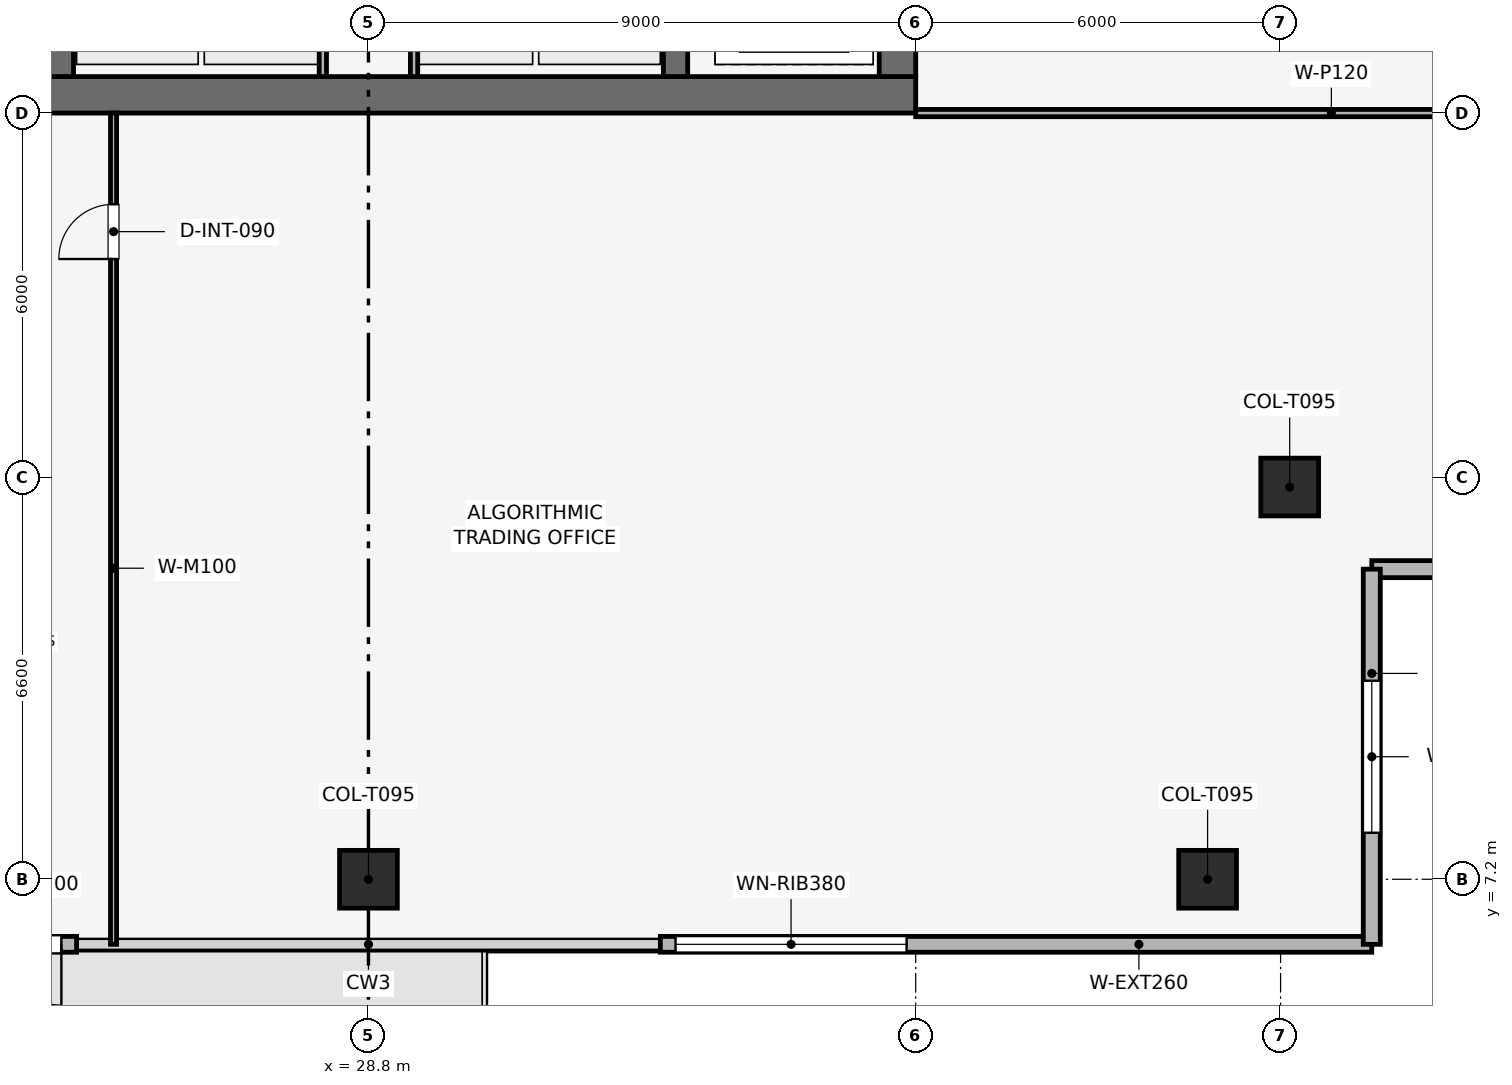
"""IFC4 building model, lengths in metres.
Left out: names, types, materials, properties, quantities, classifications, styles, units other than length and angle.
Written with IfcOpenShell. Run it as: python <this file> out.ifc"""

import sys

from ifc_helpers import new_model, si_unit, direction, frame, frame_2d, origin, origin_2d, place, context, subcontext, project, spatial, rectangle, extrude, element, fill, save


model = new_model("IFC4")
c1 = context("Model", 3, precision=1e-05, world=origin(), true_north=direction((0.0, 1.0)))
c2 = subcontext(c1, "Body", "Model", "MODEL_VIEW")
j1 = project(units=[si_unit("LENGTHUNIT", "METRE"), si_unit("PLANEANGLEUNIT", "RADIAN")], contexts=[c1])
p1 = place(None, origin())
s1 = spatial("IfcSite", under=j1, at=p1, CompositionType="ELEMENT")
p2 = place(p1, origin())
s2 = spatial("IfcBuilding", under=s1, at=p2, CompositionType="ELEMENT")
p3 = place(p2, frame((0.0, 0.0, 314.25)))
s3 = spatial("IfcBuildingStorey", under=s2, at=p3, CompositionType="ELEMENT", Elevation=314.25)
p4 = place(p3, frame((19.8, 20.1, 0.0), z_axis=(0.0, 0.0, 1.0), x_axis=(1.0, 0.0, 0.0)))
e1 = element("IfcWall", 1, at=p4, inside=s3, PredefinedType="SHEAR", context=c2, shape_type="SweptSolid", body=[
    extrude(rectangle(XDim=18.0, YDim=0.6, at=frame_2d((9.0, 0.0))), origin(), (0.0, 0.0, 1.0), 3.75),
])
p5 = place(p3, frame((37.5, 20.4, 0.0), z_axis=(0.0, 0.0, 1.0), x_axis=(0.0, 1.0, 0.0)))
e2 = element("IfcWall", 2, at=p5, inside=s3, PredefinedType="SHEAR", context=c2, shape_type="SweptSolid", body=[
    extrude(rectangle(XDim=16.8, YDim=0.6, at=frame_2d((8.4, 0.0))), origin(), (0.0, 0.0, 1.0), 3.75),
])
p6 = place(p5, frame((4.9, 0.0, 0.0)))
e3 = element("IfcOpeningElement", 3, at=p6, cuts=e2, PredefinedType="OPENING", context=c2, shape_type="SweptSolid", body=[
    extrude(rectangle(XDim=1.1, YDim=2.15, at=frame_2d((0.55, 1.075))), frame((0.0, 0.31, 0.0), z_axis=(0.0, -1.0, 0.0), x_axis=(1.0, 0.0, 0.0)), (0.0, 0.0, 1.0), 0.62),
])
for number, where, z_axis, x_axis in (
    (4, (23.75, 20.4, 0.0), (0.0, 0.0, 1.0), (0.0, 1.0, 0.0)),
    (5, (33.85, 20.4, 0.0), (0.0, 0.0, 1.0), (0.0, 1.0, 0.0)),
):
    element("IfcWall", number, at=place(p3, frame(where, z_axis=z_axis, x_axis=x_axis)), inside=s3, PredefinedType="SHEAR", context=c2, shape_type="SweptSolid", body=[
        extrude(rectangle(XDim=16.8, YDim=0.4, at=frame_2d((8.4, 0.0))), origin(), (0.0, 0.0, 1.0), 3.75),
    ])
for number, where, z_axis, x_axis in (
    (6, (28.8, 7.2, 0.003), (0.0, 0.0, 1.0), (1.0, 0.0, 0.0)),
    (7, (42.6, 7.2, 0.003), (0.0, 0.0, 1.0), (1.0, 0.0, 0.0)),
    (8, (43.95, 13.65, 0.003), (0.0, 0.0, 1.0), (1.0, 0.0, 0.0)),
):
    element("IfcColumn", number, at=place(p3, frame(where, z_axis=z_axis, x_axis=x_axis)), inside=s3, PredefinedType="COLUMN", context=c2, shape_type="SweptSolid", body=[
        extrude(rectangle(XDim=0.95, YDim=0.95, at=origin_2d()), origin(), (0.0, 0.0, 1.0), 3.504),
    ])
p7 = place(p3, frame((45.3, 6.13, 0.0), z_axis=(0.0, 0.0, 1.0), x_axis=(-1.0, 0.0, 0.0)))
e9 = element("IfcWall", 9, at=p7, inside=s3, PredefinedType="SOLIDWALL", context=c2, shape_type="SweptSolid", body=[
    extrude(rectangle(XDim=11.7, YDim=0.26, at=frame_2d((5.85, 0.0))), origin(), (0.0, 0.0, 1.0), 3.51),
])
p8 = place(p7, frame((7.65, 0.0, 0.9)))
e10 = element("IfcOpeningElement", 10, at=p8, cuts=e9, PredefinedType="OPENING", context=c2, shape_type="SweptSolid", body=[
    extrude(rectangle(XDim=3.8, YDim=1.9, at=frame_2d((1.9, 0.95))), frame((0.0, 0.14, 0.0), z_axis=(0.0, -1.0, 0.0), x_axis=(1.0, 0.0, 0.0)), (0.0, 0.0, 1.0), 0.28),
])
p9 = place(p3, frame((24.0, 6.13, 0.0), z_axis=(0.0, 0.0, 1.0), x_axis=(-1.0, 0.0, 0.0)))
e11 = element("IfcWall", 11, at=p9, inside=s3, PredefinedType="SOLIDWALL", context=c2, shape_type="SweptSolid", body=[
    extrude(rectangle(XDim=11.7, YDim=0.26, at=frame_2d((5.85, 0.0))), origin(), (0.0, 0.0, 1.0), 3.51),
])
p10 = place(p9, frame((0.25, 0.0, 0.0)))
e12 = element("IfcOpeningElement", 12, at=p10, cuts=e11, PredefinedType="OPENING", context=c2, shape_type="SweptSolid", body=[
    extrude(rectangle(XDim=1.0, YDim=2.2, at=frame_2d((0.5, 1.1))), frame((0.0, 0.14, 0.0), z_axis=(0.0, -1.0, 0.0), x_axis=(1.0, 0.0, 0.0)), (0.0, 0.0, 1.0), 0.28),
])
p11 = place(p3, frame((51.47, 12.3, 0.0), z_axis=(0.0, 0.0, 1.0), x_axis=(-1.0, 0.0, 0.0)))
e13 = element("IfcWall", 13, at=p11, inside=s3, PredefinedType="SOLIDWALL", context=c2, shape_type="SweptSolid", body=[
    extrude(rectangle(XDim=6.17, YDim=0.28, at=frame_2d((3.085, 0.0))), origin(), (0.0, 0.0, 1.0), 3.51),
])
p12 = place(p11, frame((1.835, 0.0, 0.9)))
e14 = element("IfcOpeningElement", 14, at=p12, cuts=e13, PredefinedType="OPENING", context=c2, shape_type="SweptSolid", body=[
    extrude(rectangle(XDim=2.5, YDim=1.9, at=frame_2d((1.25, 0.95))), frame((0.0, 0.15, 0.0), z_axis=(0.0, -1.0, 0.0), x_axis=(1.0, 0.0, 0.0)), (0.0, 0.0, 1.0), 0.3),
])
p13 = place(p3, frame((45.3, 12.3, 0.0), z_axis=(0.0, 0.0, 1.0), x_axis=(0.0, -1.0, 0.0)))
e15 = element("IfcWall", 15, at=p13, inside=s3, PredefinedType="SOLIDWALL", context=c2, shape_type="SweptSolid", body=[
    extrude(rectangle(XDim=6.17, YDim=0.28, at=frame_2d((3.085, 0.0))), origin(), (0.0, 0.0, 1.0), 3.51),
])
p14 = place(p13, frame((1.835, 0.0, 0.9)))
e16 = element("IfcOpeningElement", 16, at=p14, cuts=e15, PredefinedType="OPENING", context=c2, shape_type="SweptSolid", body=[
    extrude(rectangle(XDim=2.5, YDim=1.9, at=frame_2d((1.25, 0.95))), frame((0.0, 0.15, 0.0), z_axis=(0.0, -1.0, 0.0), x_axis=(1.0, 0.0, 0.0)), (0.0, 0.0, 1.0), 0.3),
])
p15 = place(p3, frame((28.05, 20.4, 0.0), z_axis=(0.0, 0.0, 1.0), x_axis=(0.0, 1.0, 0.0)))
e17 = element("IfcWall", 17, at=p15, inside=s3, PredefinedType="PARTITIONING", context=c2, shape_type="SweptSolid", body=[
    extrude(rectangle(XDim=8.15, YDim=0.12, at=frame_2d((4.075, 0.0))), origin(), (0.0, 0.0, 1.0), 3.51),
])
p16 = place(p3, frame((29.55, 20.4, 0.0), z_axis=(0.0, 0.0, 1.0), x_axis=(0.0, 1.0, 0.0)))
e18 = element("IfcWall", 18, at=p16, inside=s3, PredefinedType="PARTITIONING", context=c2, shape_type="SweptSolid", body=[
    extrude(rectangle(XDim=2.75, YDim=0.12, at=frame_2d((1.375, 0.0))), origin(), (0.0, 0.0, 1.0), 3.51),
])
p17 = place(p3, frame((24.608, 6.13, 0.0), z_axis=(0.0, 0.0, 1.0), x_axis=(0.0, 1.0, 0.0)))
e19 = element("IfcWall", 19, at=p17, inside=s3, PredefinedType="MOVABLE", context=c2, shape_type="SweptSolid", body=[
    extrude(rectangle(XDim=13.67, YDim=0.1, at=frame_2d((6.835, 0.0))), origin(), (0.0, 0.0, 1.0), 3.135),
])
p18 = place(p17, frame((11.27, 0.0, 0.0)))
e20 = element("IfcOpeningElement", 20, at=p18, cuts=e19, PredefinedType="OPENING", context=c2, shape_type="SweptSolid", body=[
    extrude(rectangle(XDim=0.9, YDim=2.1, at=frame_2d((0.45, 1.05))), frame((0.0, 0.06, 0.0), z_axis=(0.0, -1.0, 0.0), x_axis=(1.0, 0.0, 0.0)), (0.0, 0.0, 1.0), 0.12),
])
p19 = place(p3, frame((37.8, 19.8, 0.0), z_axis=(0.0, 0.0, 1.0), x_axis=(1.0, 0.0, 0.0)))
e21 = element("IfcWall", 21, at=p19, inside=s3, PredefinedType="PARTITIONING", context=c2, shape_type="SweptSolid", body=[
    extrude(rectangle(XDim=13.67, YDim=0.12, at=frame_2d((6.835, 0.0))), origin(), (0.0, 0.0, 1.0), 3.095),
])
p20 = place(p10, origin())
e22 = element("IfcDoor", 22, at=p20, inside=s3, OperationType="SINGLE_SWING_LEFT", PredefinedType="DOOR", context=c2, shape_type="SweptSolid", body=[
    extrude(rectangle(XDim=1.0, YDim=2.2, at=frame_2d((0.5, 1.1))), frame((0.0, 0.025, 0.0), z_axis=(0.0, -1.0, 0.0), x_axis=(1.0, 0.0, 0.0)), (0.0, 0.0, 1.0), 0.05),
])
fill(e12, e22)
p21 = place(p8, origin())
e23 = element("IfcWindow", 23, at=p21, inside=s3, PartitioningType="SINGLE_PANEL", PredefinedType="WINDOW", context=c2, shape_type="SweptSolid", body=[
    extrude(rectangle(XDim=3.8, YDim=1.9, at=frame_2d((1.9, 0.95))), frame((0.0, 0.03, 0.0), z_axis=(0.0, -1.0, 0.0), x_axis=(1.0, 0.0, 0.0)), (0.0, 0.0, 1.0), 0.06),
])
fill(e10, e23)
p22 = place(p14, origin())
e24 = element("IfcWindow", 24, at=p22, inside=s3, PartitioningType="SINGLE_PANEL", PredefinedType="WINDOW", context=c2, shape_type="SweptSolid", body=[
    extrude(rectangle(XDim=2.5, YDim=1.9, at=frame_2d((1.25, 0.95))), frame((0.0, 0.03, 0.0), z_axis=(0.0, -1.0, 0.0), x_axis=(1.0, 0.0, 0.0)), (0.0, 0.0, 1.0), 0.06),
])
fill(e16, e24)
p23 = place(p18, origin())
e25 = element("IfcDoor", 25, at=p23, inside=s3, OperationType="SINGLE_SWING_LEFT", PredefinedType="DOOR", context=c2, shape_type="SweptSolid", body=[
    extrude(rectangle(XDim=0.9, YDim=2.1, at=frame_2d((0.45, 1.05))), frame((0.0, 0.025, 0.0), z_axis=(0.0, -1.0, 0.0), x_axis=(1.0, 0.0, 0.0)), (0.0, 0.0, 1.0), 0.05),
])
fill(e20, e25)
save(model, sys.argv[1])
